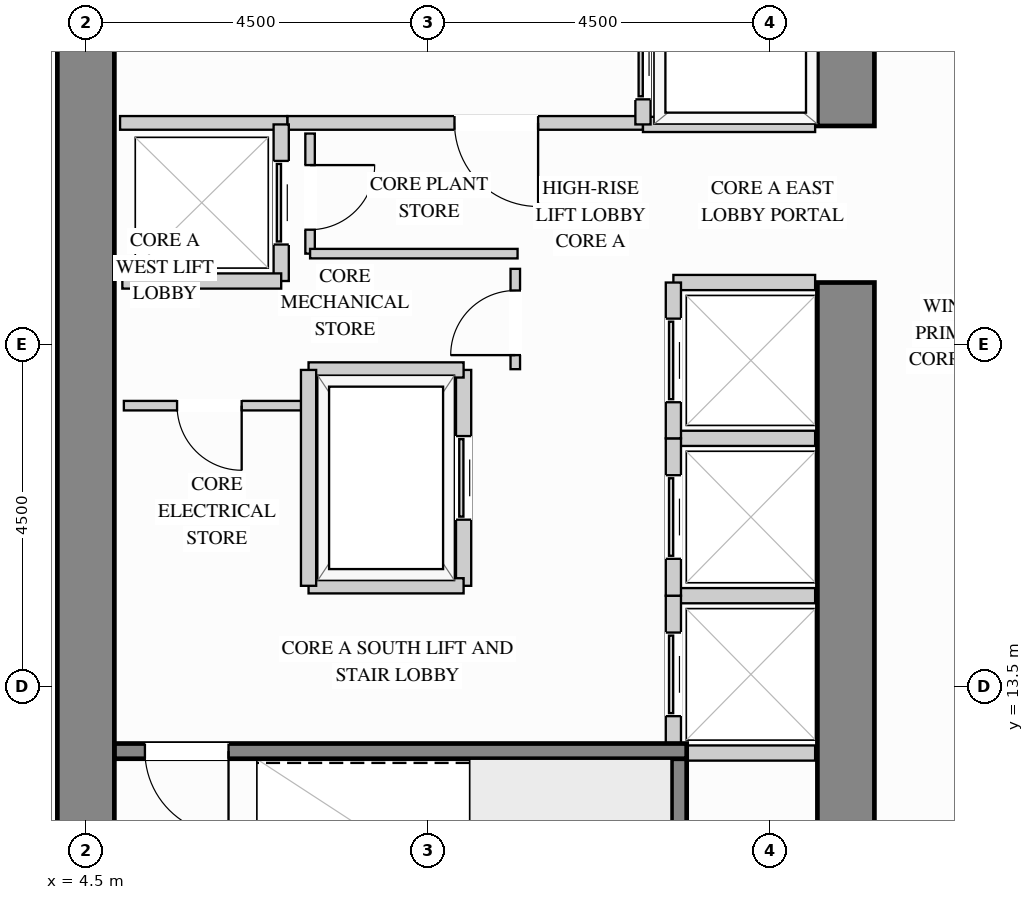
"""IFC4 building model, lengths in metres.
Left out: names, types, materials, properties, quantities, classifications, styles, units other than length and angle.
Written with IfcOpenShell. Run it as: python <this file> out.ifc"""

import sys

from ifc_helpers import new_model, si_unit, direction, frame, frame_2d, origin, place, context, subcontext, project, spatial, rectangle, extrude, source, transform, mapped, element, fill, save


model = new_model("IFC4")
c1 = context("Model", 3, precision=1e-05, world=origin(), true_north=direction((0.0, 1.0)))
c2 = subcontext(c1, "Body", "Model", "MODEL_VIEW")
j1 = project(units=[si_unit("LENGTHUNIT", "METRE"), si_unit("PLANEANGLEUNIT", "RADIAN")], contexts=[c1])
p1 = place(None, origin())
s1 = spatial("IfcSite", under=j1, at=p1, CompositionType="ELEMENT")
p2 = place(p1, origin())
s2 = spatial("IfcBuilding", under=s1, at=p2, CompositionType="ELEMENT")
p3 = place(p2, frame((0.0, 0.0, 131.4)))
s3 = spatial("IfcBuildingStorey", under=s2, at=p3, CompositionType="ELEMENT", Elevation=131.4)
m1 = source(origin(), c2, "Body", "SweptSolid", [
    extrude(rectangle(XDim=9.945, YDim=0.75, at=frame_2d((4.973, 0.0))), origin(), (0.0, 0.0, 1.0), 3.38),
])
p4 = place(p3, frame((14.5, 8.875, 0.0), z_axis=(0.0, 0.0, 1.0), x_axis=(0.0, 1.0, 0.0)))
e1 = element("IfcWall", 1, at=p4, inside=s3, PredefinedType="SHEAR", context=c2, shape_type="MappedRepresentation", body=[
    mapped(m1, transform((0.0, 0.0, 0.0), x_axis=(1.0, 0.0, 0.0), y_axis=(0.0, 1.0, 0.0), z_axis=(0.0, 0.0, 1.0))),
])
m2 = source(origin(), c2, "Body", "SweptSolid", [
    extrude(rectangle(XDim=8.245, YDim=0.75, at=frame_2d((4.123, 0.0))), origin(), (0.0, 0.0, 1.0), 3.38),
])
p5 = place(p3, frame((14.5, 20.88, 0.0), z_axis=(0.0, 0.0, 1.0), x_axis=(0.0, 1.0, 0.0)))
e2 = element("IfcWall", 2, at=p5, inside=s3, PredefinedType="SHEAR", context=c2, shape_type="MappedRepresentation", body=[
    mapped(m2, transform((0.0, 0.0, 0.0), x_axis=(1.0, 0.0, 0.0), y_axis=(0.0, 1.0, 0.0), z_axis=(0.0, 0.0, 1.0))),
])
m3 = source(origin(), c2, "Body", "SweptSolid", [
    extrude(rectangle(XDim=20.25, YDim=0.75, at=frame_2d((10.125, 0.0))), origin(), (0.0, 0.0, 1.0), 3.38),
])
p6 = place(p3, frame((4.5, 8.875, 0.0), z_axis=(0.0, 0.0, 1.0), x_axis=(0.0, 1.0, 0.0)))
e3 = element("IfcWall", 3, at=p6, inside=s3, PredefinedType="SHEAR", context=c2, shape_type="MappedRepresentation", body=[
    mapped(m3, transform((0.0, 0.0, 0.0), x_axis=(1.0, 0.0, 0.0), y_axis=(0.0, 1.0, 0.0), z_axis=(0.0, 0.0, 1.0))),
])
p7 = place(p3, frame((7.15, 20.92, 0.0), z_axis=(0.0, 0.0, 1.0), x_axis=(1.0, 0.0, 0.0)))
e4 = element("IfcWall", 4, at=p7, inside=s3, PredefinedType="PARTITIONING", context=c2, shape_type="SweptSolid", body=[
    extrude(rectangle(XDim=4.68, YDim=0.18, at=frame_2d((2.34, 0.0))), origin(), (0.0, 0.0, 1.0), 3.365),
])
p8 = place(p7, frame((2.2, 0.0, 0.0)))
e5 = element("IfcOpeningElement", 5, at=p8, cuts=e4, PredefinedType="OPENING", context=c2, shape_type="SweptSolid", body=[
    extrude(rectangle(XDim=1.1, YDim=2.15, at=frame_2d((0.55, 1.075))), frame((0.0, 0.1, 0.0), z_axis=(0.0, -1.0, 0.0), x_axis=(1.0, 0.0, 0.0)), (0.0, 0.0, 1.0), 0.2),
])
m4 = source(origin(), c2, "Body", "SweptSolid", [
    extrude(rectangle(XDim=2.2, YDim=0.18, at=frame_2d((1.1, 0.0))), origin(), (0.0, 0.0, 1.0), 3.365),
])
p9 = place(p3, frame((4.95, 20.92, 0.0), z_axis=(0.0, 0.0, 1.0), x_axis=(1.0, 0.0, 0.0)))
e6 = element("IfcWall", 6, at=p9, inside=s3, PredefinedType="PARTITIONING", context=c2, shape_type="MappedRepresentation", body=[
    mapped(m4, transform((0.0, 0.0, 0.0), x_axis=(1.0, 0.0, 0.0), y_axis=(0.0, 1.0, 0.0), z_axis=(0.0, 0.0, 1.0))),
])
p10 = place(p3, frame((10.15, 17.68, 0.0), z_axis=(0.0, 0.0, 1.0), x_axis=(0.0, 1.0, 0.0)))
e7 = element("IfcWall", 7, at=p10, inside=s3, PredefinedType="PARTITIONING", context=c2, shape_type="SweptSolid", body=[
    extrude(rectangle(XDim=1.32, YDim=0.125, at=frame_2d((0.66, 0.0))), origin(), (0.0, 0.0, 1.0), 3.365),
])
p11 = place(p10, frame((0.185, 0.0, 0.0)))
e8 = element("IfcOpeningElement", 8, at=p11, cuts=e7, PredefinedType="OPENING", context=c2, shape_type="SweptSolid", body=[
    extrude(rectangle(XDim=0.85, YDim=2.1, at=frame_2d((0.425, 1.05))), frame((0.0, 0.073, 0.0), z_axis=(0.0, -1.0, 0.0), x_axis=(1.0, 0.0, 0.0)), (0.0, 0.0, 1.0), 0.145),
])
p12 = place(p3, frame((7.45, 19.2, 0.0), z_axis=(0.0, 0.0, 1.0), x_axis=(0.0, 1.0, 0.0)))
e9 = element("IfcWall", 9, at=p12, inside=s3, PredefinedType="PARTITIONING", context=c2, shape_type="SweptSolid", body=[
    extrude(rectangle(XDim=1.58, YDim=0.125, at=frame_2d((0.79, 0.0))), origin(), (0.0, 0.0, 1.0), 3.365),
])
p13 = place(p12, frame((0.315, 0.0, 0.0)))
e10 = element("IfcOpeningElement", 10, at=p13, cuts=e9, PredefinedType="OPENING", context=c2, shape_type="SweptSolid", body=[
    extrude(rectangle(XDim=0.85, YDim=2.1, at=frame_2d((0.425, 1.05))), frame((0.0, 0.073, 0.0), z_axis=(0.0, -1.0, 0.0), x_axis=(1.0, 0.0, 0.0)), (0.0, 0.0, 1.0), 0.145),
])
m5 = source(origin(), c2, "Body", "SweptSolid", [
    extrude(rectangle(XDim=2.73, YDim=0.125, at=frame_2d((1.365, 0.0))), origin(), (0.0, 0.0, 1.0), 3.365),
])
p14 = place(p3, frame((7.45, 19.2, 0.0), z_axis=(0.0, 0.0, 1.0), x_axis=(1.0, 0.0, 0.0)))
e11 = element("IfcWall", 11, at=p14, inside=s3, PredefinedType="PARTITIONING", context=c2, shape_type="MappedRepresentation", body=[
    mapped(m5, transform((0.0, 0.0, 0.0), x_axis=(1.0, 0.0, 0.0), y_axis=(0.0, 1.0, 0.0), z_axis=(0.0, 0.0, 1.0))),
])
p15 = place(p3, frame((5.0, 17.2, 0.0), z_axis=(0.0, 0.0, 1.0), x_axis=(1.0, 0.0, 0.0)))
e12 = element("IfcWall", 12, at=p15, inside=s3, PredefinedType="PARTITIONING", context=c2, shape_type="SweptSolid", body=[
    extrude(rectangle(XDim=2.4, YDim=0.125, at=frame_2d((1.2, 0.0))), origin(), (0.0, 0.0, 1.0), 3.365),
])
p16 = place(p15, frame((0.7, 0.0, 0.0)))
e13 = element("IfcOpeningElement", 13, at=p16, cuts=e12, PredefinedType="OPENING", context=c2, shape_type="SweptSolid", body=[
    extrude(rectangle(XDim=0.85, YDim=2.1, at=frame_2d((0.425, 1.05))), frame((0.0, 0.073, 0.0), z_axis=(0.0, -1.0, 0.0), x_axis=(1.0, 0.0, 0.0)), (0.0, 0.0, 1.0), 0.145),
])
m6 = source(origin(), c2, "Body", "SweptSolid", [
    extrude(rectangle(XDim=2.265, YDim=0.2, at=frame_2d((1.132, 0.0))), origin(), (0.0, 0.0, 1.0), 3.365),
])
p17 = place(p3, frame((11.83, 20.9, 0.0), z_axis=(0.0, 0.0, 1.0), x_axis=(1.0, 0.0, 0.0)))
e14 = element("IfcWall", 14, at=p17, inside=s3, PredefinedType="PARTITIONING", context=c2, shape_type="MappedRepresentation", body=[
    mapped(m6, transform((0.0, 0.0, 0.0), x_axis=(1.0, 0.0, 0.0), y_axis=(0.0, 1.0, 0.0), z_axis=(0.0, 0.0, 1.0))),
])
p18 = place(p3, frame((11.83, 20.9, 0.0), z_axis=(0.0, 0.0, 1.0), x_axis=(0.0, 1.0, 0.0)))
e15 = element("IfcWall", 15, at=p18, inside=s3, PredefinedType="PARTITIONING", context=c2, shape_type="SweptSolid", body=[
    extrude(rectangle(XDim=1.76, YDim=0.2, at=frame_2d((0.88, 0.0))), origin(), (0.0, 0.0, 1.0), 3.365),
])
p19 = place(p18, frame((0.33, 0.0, 0.0)))
e16 = element("IfcOpeningElement", 16, at=p19, cuts=e15, PredefinedType="OPENING", context=c2, shape_type="SweptSolid", body=[
    extrude(rectangle(XDim=1.1, YDim=2.2, at=frame_2d((0.55, 1.1))), frame((0.0, 0.11, 0.0), z_axis=(0.0, -1.0, 0.0), x_axis=(1.0, 0.0, 0.0)), (0.0, 0.0, 1.0), 0.22),
])
m7 = source(origin(), c2, "Body", "SweptSolid", [
    extrude(rectangle(XDim=1.865, YDim=0.2, at=frame_2d((0.933, 0.0))), origin(), (0.0, 0.0, 1.0), 3.365),
])
for number, where, z_axis, x_axis in (
    (17, (12.23, 14.7, 0.0), (0.0, 0.0, 1.0), (1.0, 0.0, 0.0)),
    (18, (12.23, 12.63, 0.0), (0.0, 0.0, 1.0), (1.0, 0.0, 0.0)),
):
    element("IfcWall", number, at=place(p3, frame(where, z_axis=z_axis, x_axis=x_axis)), inside=s3, PredefinedType="PARTITIONING", context=c2, shape_type="MappedRepresentation", body=[
        mapped(m7, transform((0.0, 0.0, 0.0), x_axis=(1.0, 0.0, 0.0), y_axis=(0.0, 1.0, 0.0), z_axis=(0.0, 0.0, 1.0))),
    ])
p20 = place(p3, frame((12.23, 12.63, 0.0), z_axis=(0.0, 0.0, 1.0), x_axis=(0.0, 1.0, 0.0)))
e19 = element("IfcWall", 19, at=p20, inside=s3, PredefinedType="PARTITIONING", context=c2, shape_type="SweptSolid", body=[
    extrude(rectangle(XDim=2.07, YDim=0.2, at=frame_2d((1.035, 0.0))), origin(), (0.0, 0.0, 1.0), 3.365),
])
p21 = place(p20, frame((0.485, 0.0, 0.0)))
e20 = element("IfcOpeningElement", 20, at=p21, cuts=e19, PredefinedType="OPENING", context=c2, shape_type="SweptSolid", body=[
    extrude(rectangle(XDim=1.1, YDim=2.2, at=frame_2d((0.55, 1.1))), frame((0.0, 0.11, 0.0), z_axis=(0.0, -1.0, 0.0), x_axis=(1.0, 0.0, 0.0)), (0.0, 0.0, 1.0), 0.22),
])
p22 = place(p3, frame((12.23, 16.77, 0.0), z_axis=(0.0, 0.0, 1.0), x_axis=(1.0, 0.0, 0.0)))
e21 = element("IfcWall", 21, at=p22, inside=s3, PredefinedType="PARTITIONING", context=c2, shape_type="MappedRepresentation", body=[
    mapped(m7, transform((0.0, 0.0, 0.0), x_axis=(1.0, 0.0, 0.0), y_axis=(0.0, 1.0, 0.0), z_axis=(0.0, 0.0, 1.0))),
])
p23 = place(p3, frame((12.23, 14.7, 0.0), z_axis=(0.0, 0.0, 1.0), x_axis=(0.0, 1.0, 0.0)))
e22 = element("IfcWall", 22, at=p23, inside=s3, PredefinedType="PARTITIONING", context=c2, shape_type="SweptSolid", body=[
    extrude(rectangle(XDim=2.07, YDim=0.2, at=frame_2d((1.035, 0.0))), origin(), (0.0, 0.0, 1.0), 3.365),
])
p24 = place(p23, frame((0.485, 0.0, 0.0)))
e23 = element("IfcOpeningElement", 23, at=p24, cuts=e22, PredefinedType="OPENING", context=c2, shape_type="SweptSolid", body=[
    extrude(rectangle(XDim=1.1, YDim=2.2, at=frame_2d((0.55, 1.1))), frame((0.0, 0.11, 0.0), z_axis=(0.0, -1.0, 0.0), x_axis=(1.0, 0.0, 0.0)), (0.0, 0.0, 1.0), 0.22),
])
p25 = place(p3, frame((12.23, 18.82, 0.0), z_axis=(0.0, 0.0, 1.0), x_axis=(1.0, 0.0, 0.0)))
e24 = element("IfcWall", 24, at=p25, inside=s3, PredefinedType="PARTITIONING", context=c2, shape_type="MappedRepresentation", body=[
    mapped(m7, transform((0.0, 0.0, 0.0), x_axis=(1.0, 0.0, 0.0), y_axis=(0.0, 1.0, 0.0), z_axis=(0.0, 0.0, 1.0))),
])
p26 = place(p3, frame((12.23, 16.77, 0.0), z_axis=(0.0, 0.0, 1.0), x_axis=(0.0, 1.0, 0.0)))
e25 = element("IfcWall", 25, at=p26, inside=s3, PredefinedType="PARTITIONING", context=c2, shape_type="SweptSolid", body=[
    extrude(rectangle(XDim=2.05, YDim=0.2, at=frame_2d((1.025, 0.0))), origin(), (0.0, 0.0, 1.0), 3.365),
])
p27 = place(p26, frame((0.475, 0.0, 0.0)))
e26 = element("IfcOpeningElement", 26, at=p27, cuts=e25, PredefinedType="OPENING", context=c2, shape_type="SweptSolid", body=[
    extrude(rectangle(XDim=1.1, YDim=2.2, at=frame_2d((0.55, 1.1))), frame((0.0, 0.11, 0.0), z_axis=(0.0, -1.0, 0.0), x_axis=(1.0, 0.0, 0.0)), (0.0, 0.0, 1.0), 0.22),
])
p28 = place(p3, frame((7.07, 18.84, 0.0), z_axis=(0.0, 0.0, 1.0), x_axis=(0.0, 1.0, 0.0)))
e27 = element("IfcWall", 27, at=p28, inside=s3, PredefinedType="PARTITIONING", context=c2, shape_type="SweptSolid", body=[
    extrude(rectangle(XDim=2.06, YDim=0.2, at=frame_2d((1.03, 0.0))), origin(), (0.0, 0.0, 1.0), 3.365),
])
p29 = place(p28, frame((0.48, 0.0, 0.0)))
e28 = element("IfcOpeningElement", 28, at=p29, cuts=e27, PredefinedType="OPENING", context=c2, shape_type="SweptSolid", body=[
    extrude(rectangle(XDim=1.1, YDim=2.2, at=frame_2d((0.55, 1.1))), frame((0.0, 0.11, 0.0), z_axis=(0.0, -1.0, 0.0), x_axis=(1.0, 0.0, 0.0)), (0.0, 0.0, 1.0), 0.22),
])
m8 = source(origin(), c2, "Body", "SweptSolid", [
    extrude(rectangle(XDim=2.09, YDim=0.2, at=frame_2d((1.045, 0.0))), origin(), (0.0, 0.0, 1.0), 3.365),
])
p30 = place(p3, frame((4.98, 18.84, 0.0), z_axis=(0.0, 0.0, 1.0), x_axis=(1.0, 0.0, 0.0)))
e29 = element("IfcWall", 29, at=p30, inside=s3, PredefinedType="PARTITIONING", context=c2, shape_type="MappedRepresentation", body=[
    mapped(m8, transform((0.0, 0.0, 0.0), x_axis=(1.0, 0.0, 0.0), y_axis=(0.0, 1.0, 0.0), z_axis=(0.0, 0.0, 1.0))),
])
p31 = place(p3, frame((9.47, 14.83, 0.0), z_axis=(0.0, 0.0, 1.0), x_axis=(0.0, 1.0, 0.0)))
e30 = element("IfcWall", 30, at=p31, inside=s3, PredefinedType="PARTITIONING", context=c2, shape_type="SweptSolid", body=[
    extrude(rectangle(XDim=2.84, YDim=0.2, at=frame_2d((1.42, 0.0))), origin(), (0.0, 0.0, 1.0), 3.365),
])
p32 = place(p31, frame((0.87, 0.0, 0.0)))
e31 = element("IfcOpeningElement", 31, at=p32, cuts=e30, PredefinedType="OPENING", context=c2, shape_type="SweptSolid", body=[
    extrude(rectangle(XDim=1.1, YDim=2.2, at=frame_2d((0.55, 1.1))), frame((0.0, 0.11, 0.0), z_axis=(0.0, -1.0, 0.0), x_axis=(1.0, 0.0, 0.0)), (0.0, 0.0, 1.0), 0.22),
])
m9 = source(origin(), c2, "Body", "SweptSolid", [
    extrude(rectangle(XDim=2.04, YDim=0.2, at=frame_2d((1.02, 0.0))), origin(), (0.0, 0.0, 1.0), 3.365),
])
for number, where, z_axis, x_axis in (
    (32, (7.43, 17.67, 0.0), (0.0, 0.0, 1.0), (1.0, 0.0, 0.0)),
    (33, (7.43, 14.83, 0.0), (0.0, 0.0, 1.0), (1.0, 0.0, 0.0)),
):
    element("IfcWall", number, at=place(p3, frame(where, z_axis=z_axis, x_axis=x_axis)), inside=s3, PredefinedType="PARTITIONING", context=c2, shape_type="MappedRepresentation", body=[
        mapped(m9, transform((0.0, 0.0, 0.0), x_axis=(1.0, 0.0, 0.0), y_axis=(0.0, 1.0, 0.0), z_axis=(0.0, 0.0, 1.0))),
    ])
m10 = source(origin(), c2, "Body", "SweptSolid", [
    extrude(rectangle(XDim=2.84, YDim=0.2, at=frame_2d((1.42, 0.0))), origin(), (0.0, 0.0, 1.0), 3.365),
])
p33 = place(p3, frame((7.43, 14.83, 0.0), z_axis=(0.0, 0.0, 1.0), x_axis=(0.0, 1.0, 0.0)))
e34 = element("IfcWall", 34, at=p33, inside=s3, PredefinedType="PARTITIONING", context=c2, shape_type="MappedRepresentation", body=[
    mapped(m10, transform((0.0, 0.0, 0.0), x_axis=(1.0, 0.0, 0.0), y_axis=(0.0, 1.0, 0.0), z_axis=(0.0, 0.0, 1.0))),
])
m11 = source(origin(), c2, "Body", "SweptSolid", [
    extrude(rectangle(XDim=3.678, YDim=0.2, at=frame_2d((1.839, 0.0))), origin(), (0.0, 0.0, 1.0), 3.38),
])
p34 = place(p3, frame((12.305, 8.877, 0.0), z_axis=(0.0, 0.0, 1.0), x_axis=(0.0, 1.0, 0.0)))
e35 = element("IfcWall", 35, at=p34, inside=s3, PredefinedType="SHEAR", context=c2, shape_type="MappedRepresentation", body=[
    mapped(m11, transform((0.0, 0.0, 0.0), x_axis=(1.0, 0.0, 0.0), y_axis=(0.0, 1.0, 0.0), z_axis=(0.0, 0.0, 1.0))),
])
p35 = place(p3, frame((4.877, 12.655, 0.0), z_axis=(0.0, 0.0, 1.0), x_axis=(1.0, 0.0, 0.0)))
e36 = element("IfcWall", 36, at=p35, inside=s3, PredefinedType="SHEAR", context=c2, shape_type="SweptSolid", body=[
    extrude(rectangle(XDim=7.528, YDim=0.2, at=frame_2d((3.764, 0.0))), origin(), (0.0, 0.0, 1.0), 3.38),
])
p36 = place(p35, frame((0.4, 0.0, 0.0)))
e37 = element("IfcOpeningElement", 37, at=p36, cuts=e36, PredefinedType="OPENING", context=c2, shape_type="SweptSolid", body=[
    extrude(rectangle(XDim=1.1, YDim=2.15, at=frame_2d((0.55, 1.075))), frame((0.0, 0.11, 0.0), z_axis=(0.0, -1.0, 0.0), x_axis=(1.0, 0.0, 0.0)), (0.0, 0.0, 1.0), 0.22),
])
m12 = source(origin(), c2, "Body", "SweptSolid", [
    extrude(rectangle(XDim=1.1, YDim=2.15, at=frame_2d((0.55, 1.075))), frame((0.0, 0.025, 0.0), z_axis=(0.0, -1.0, 0.0), x_axis=(1.0, 0.0, 0.0)), (0.0, 0.0, 1.0), 0.05),
])
p37 = place(p8, origin())
e38 = element("IfcDoor", 38, at=p37, inside=s3, OperationType="SINGLE_SWING_RIGHT", PredefinedType="DOOR", context=c2, shape_type="MappedRepresentation", body=[
    mapped(m12, transform((0.0, 0.0, 0.0), x_axis=(1.0, 0.0, 0.0), y_axis=(0.0, 1.0, 0.0), z_axis=(0.0, 0.0, 1.0))),
])
fill(e5, e38)
m13 = source(origin(), c2, "Body", "SweptSolid", [
    extrude(rectangle(XDim=1.1, YDim=2.2, at=frame_2d((0.55, 1.1))), frame((0.0, 0.025, 0.0), z_axis=(0.0, -1.0, 0.0), x_axis=(1.0, 0.0, 0.0)), (0.0, 0.0, 1.0), 0.05),
])
p38 = place(p19, origin())
e39 = element("IfcDoor", 39, at=p38, inside=s3, OperationType="SLIDING_TO_LEFT", PredefinedType="DOOR", context=c2, shape_type="MappedRepresentation", body=[
    mapped(m13, transform((0.0, 0.0, 0.0), x_axis=(1.0, 0.0, 0.0), y_axis=(0.0, 1.0, 0.0), z_axis=(0.0, 0.0, 1.0))),
])
fill(e16, e39)
p39 = place(p21, origin())
e40 = element("IfcDoor", 40, at=p39, inside=s3, OperationType="SLIDING_TO_LEFT", PredefinedType="DOOR", context=c2, shape_type="MappedRepresentation", body=[
    mapped(m13, transform((0.0, 0.0, 0.0), x_axis=(1.0, 0.0, 0.0), y_axis=(0.0, 1.0, 0.0), z_axis=(0.0, 0.0, 1.0))),
])
fill(e20, e40)
p40 = place(p24, origin())
e41 = element("IfcDoor", 41, at=p40, inside=s3, OperationType="SLIDING_TO_LEFT", PredefinedType="DOOR", context=c2, shape_type="MappedRepresentation", body=[
    mapped(m13, transform((0.0, 0.0, 0.0), x_axis=(1.0, 0.0, 0.0), y_axis=(0.0, 1.0, 0.0), z_axis=(0.0, 0.0, 1.0))),
])
fill(e23, e41)
p41 = place(p27, origin())
e42 = element("IfcDoor", 42, at=p41, inside=s3, OperationType="SLIDING_TO_LEFT", PredefinedType="DOOR", context=c2, shape_type="MappedRepresentation", body=[
    mapped(m13, transform((0.0, 0.0, 0.0), x_axis=(1.0, 0.0, 0.0), y_axis=(0.0, 1.0, 0.0), z_axis=(0.0, 0.0, 1.0))),
])
fill(e26, e42)
p42 = place(p29, origin())
e43 = element("IfcDoor", 43, at=p42, inside=s3, OperationType="SLIDING_TO_LEFT", PredefinedType="DOOR", context=c2, shape_type="MappedRepresentation", body=[
    mapped(m13, transform((0.0, 0.0, 0.0), x_axis=(1.0, 0.0, 0.0), y_axis=(0.0, 1.0, 0.0), z_axis=(0.0, 0.0, 1.0))),
])
fill(e28, e43)
p43 = place(p32, origin())
e44 = element("IfcDoor", 44, at=p43, inside=s3, OperationType="SLIDING_TO_LEFT", PredefinedType="DOOR", context=c2, shape_type="MappedRepresentation", body=[
    mapped(m13, transform((0.0, 0.0, 0.0), x_axis=(1.0, 0.0, 0.0), y_axis=(0.0, 1.0, 0.0), z_axis=(0.0, 0.0, 1.0))),
])
fill(e31, e44)
m14 = source(origin(), c2, "Body", "SweptSolid", [
    extrude(rectangle(XDim=0.85, YDim=2.1, at=frame_2d((0.425, 1.05))), frame((0.0, 0.025, 0.0), z_axis=(0.0, -1.0, 0.0), x_axis=(1.0, 0.0, 0.0)), (0.0, 0.0, 1.0), 0.05),
])
p44 = place(p11, origin())
e45 = element("IfcDoor", 45, at=p44, inside=s3, OperationType="SINGLE_SWING_LEFT", PredefinedType="DOOR", context=c2, shape_type="MappedRepresentation", body=[
    mapped(m14, transform((0.0, 0.0, 0.0), x_axis=(1.0, 0.0, 0.0), y_axis=(0.0, 1.0, 0.0), z_axis=(0.0, 0.0, 1.0))),
])
fill(e8, e45)
p45 = place(p16, origin())
e46 = element("IfcDoor", 46, at=p45, inside=s3, OperationType="SINGLE_SWING_RIGHT", PredefinedType="DOOR", context=c2, shape_type="MappedRepresentation", body=[
    mapped(m14, transform((0.0, 0.0, 0.0), x_axis=(1.0, 0.0, 0.0), y_axis=(0.0, 1.0, 0.0), z_axis=(0.0, 0.0, 1.0))),
])
fill(e13, e46)
p46 = place(p13, origin())
e47 = element("IfcDoor", 47, at=p46, inside=s3, OperationType="SINGLE_SWING_RIGHT", PredefinedType="DOOR", context=c2, shape_type="MappedRepresentation", body=[
    mapped(m14, transform((0.0, 0.0, 0.0), x_axis=(1.0, 0.0, 0.0), y_axis=(0.0, 1.0, 0.0), z_axis=(0.0, 0.0, 1.0))),
])
fill(e10, e47)
m15 = source(origin(), c2, "Body", "SweptSolid", [
    extrude(rectangle(XDim=1.1, YDim=2.15, at=frame_2d((0.55, 1.075))), frame((0.0, 0.025, 0.0), z_axis=(0.0, -1.0, 0.0), x_axis=(1.0, 0.0, 0.0)), (0.0, 0.0, 1.0), 0.05),
])
p47 = place(p36, origin())
e48 = element("IfcDoor", 48, at=p47, inside=s3, OperationType="SINGLE_SWING_RIGHT", PredefinedType="DOOR", context=c2, shape_type="MappedRepresentation", body=[
    mapped(m15, transform((0.0, 0.0, 0.0), x_axis=(1.0, 0.0, 0.0), y_axis=(0.0, 1.0, 0.0), z_axis=(0.0, 0.0, 1.0))),
])
fill(e37, e48)
save(model, sys.argv[1])
